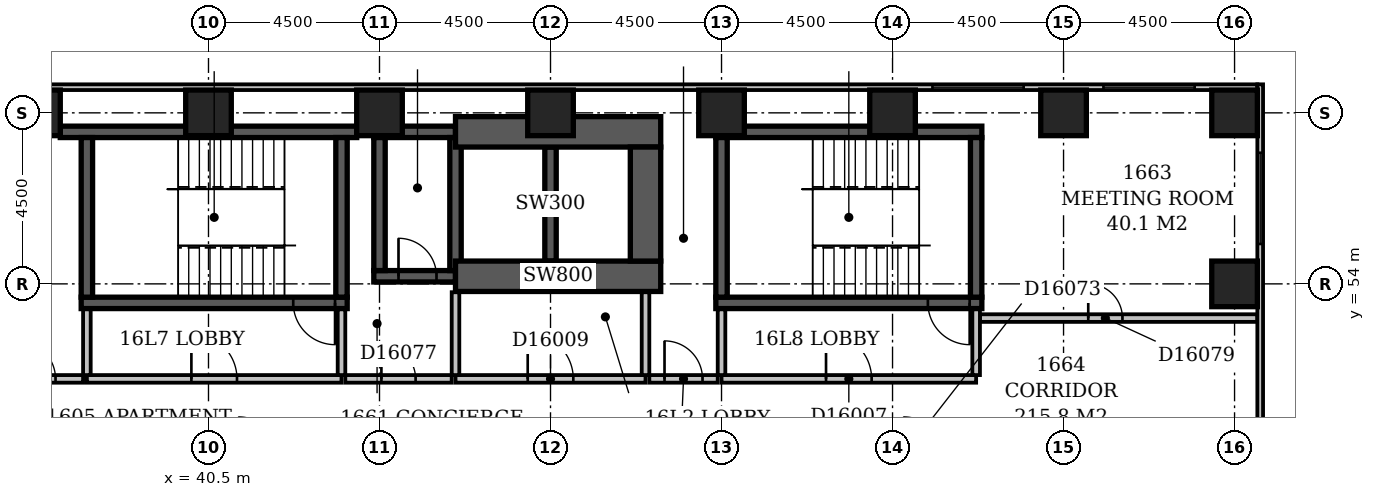
"""IFC4 building model, lengths in metres.
Left out: names, types, materials, properties, quantities, classifications, styles, units other than length and angle.
Written with IfcOpenShell. Run it as: python <this file> out.ifc"""

import sys

from ifc_helpers import new_model, si_unit, direction, frame, frame_2d, origin, origin_2d, place, context, subcontext, project, spatial, rectangle, extrude, element, fill, save


model = new_model("IFC4")
c1 = context("Model", 3, precision=1e-05, world=origin(), true_north=direction((0.0, 1.0)))
c2 = subcontext(c1, "Body", "Model", "MODEL_VIEW")
j1 = project(units=[si_unit("LENGTHUNIT", "METRE"), si_unit("PLANEANGLEUNIT", "RADIAN")], contexts=[c1])
p1 = place(None, origin())
s1 = spatial("IfcSite", under=j1, at=p1, CompositionType="ELEMENT")
p2 = place(p1, origin())
s2 = spatial("IfcBuilding", under=s1, at=p2, CompositionType="ELEMENT")
p3 = place(p2, frame((0.0, 0.0, 68.6)))
s3 = spatial("IfcBuildingStorey", under=s2, at=p3, CompositionType="ELEMENT", Elevation=68.6)
p4 = place(p3, frame((36.6, 58.0, -0.3), z_axis=(0.0, 0.0, 1.0), x_axis=(1.0, 0.0, 0.0)))
e1 = element("IfcWall", 1, at=p4, inside=s3, PredefinedType="SHEAR", context=c2, shape_type="SweptSolid", body=[
    extrude(rectangle(XDim=7.8, YDim=0.3, at=frame_2d((3.9, 0.0))), origin(), (0.0, 0.0, 1.0), 3.6),
])
p5 = place(p3, frame((37.15, 53.5, -0.3), z_axis=(0.0, 0.0, 1.0), x_axis=(1.0, 0.0, 0.0)))
e2 = element("IfcWall", 2, at=p5, inside=s3, PredefinedType="SHEAR", context=c2, shape_type="SweptSolid", body=[
    extrude(rectangle(XDim=7.0, YDim=0.3, at=frame_2d((3.5, 0.0))), origin(), (0.0, 0.0, 1.0), 3.6),
])
p6 = place(p5, frame((5.58, 0.0, 0.3)))
e3 = element("IfcOpeningElement", 3, at=p6, cuts=e2, PredefinedType="OPENING", context=c2, shape_type="SweptSolid", body=[
    extrude(rectangle(XDim=1.1, YDim=2.1, at=frame_2d((0.55, 1.05))), frame((0.0, 0.162, 0.0), z_axis=(0.0, -1.0, 0.0), x_axis=(1.0, 0.0, 0.0)), (0.0, 0.0, 1.0), 0.324),
])
for number, where, z_axis, x_axis in (
    (4, (37.3, 53.65, -0.3), (0.0, 0.0, 1.0), (0.0, 1.0, 0.0)),
    (5, (44.0, 53.65, -0.3), (0.0, 0.0, 1.0), (0.0, 1.0, 0.0)),
):
    element("IfcWall", number, at=place(p3, frame(where, z_axis=z_axis, x_axis=x_axis)), inside=s3, PredefinedType="SHEAR", context=c2, shape_type="SweptSolid", body=[
        extrude(rectangle(XDim=4.2, YDim=0.3, at=frame_2d((2.1, 0.0))), origin(), (0.0, 0.0, 1.0), 3.6),
    ])
p7 = place(p3, frame((44.85, 54.2, -0.3), z_axis=(0.0, 0.0, 1.0), x_axis=(1.0, 0.0, 0.0)))
e6 = element("IfcWall", 6, at=p7, inside=s3, PredefinedType="SHEAR", context=c2, shape_type="SweptSolid", body=[
    extrude(rectangle(XDim=2.15, YDim=0.3, at=frame_2d((1.075, 0.0))), origin(), (0.0, 0.0, 1.0), 3.6),
])
p8 = place(p7, frame((0.65, 0.0, 0.3)))
e7 = element("IfcOpeningElement", 7, at=p8, cuts=e6, PredefinedType="OPENING", context=c2, shape_type="SweptSolid", body=[
    extrude(rectangle(XDim=1.0, YDim=2.1, at=frame_2d((0.5, 1.05))), frame((0.0, 0.162, 0.0), z_axis=(0.0, -1.0, 0.0), x_axis=(1.0, 0.0, 0.0)), (0.0, 0.0, 1.0), 0.324),
])
p9 = place(p3, frame((44.85, 58.0, -0.3), z_axis=(0.0, 0.0, 1.0), x_axis=(1.0, 0.0, 0.0)))
e8 = element("IfcWall", 8, at=p9, inside=s3, PredefinedType="SHEAR", context=c2, shape_type="SweptSolid", body=[
    extrude(rectangle(XDim=2.15, YDim=0.3, at=frame_2d((1.075, 0.0))), origin(), (0.0, 0.0, 1.0), 3.6),
])
p10 = place(p3, frame((45.0, 54.35, -0.3), z_axis=(0.0, 0.0, 1.0), x_axis=(0.0, 1.0, 0.0)))
e9 = element("IfcWall", 9, at=p10, inside=s3, PredefinedType="SHEAR", context=c2, shape_type="SweptSolid", body=[
    extrude(rectangle(XDim=3.5, YDim=0.3, at=frame_2d((1.75, 0.0))), origin(), (0.0, 0.0, 1.0), 3.6),
])
p11 = place(p3, frame((47.0, 54.2, -0.3), z_axis=(0.0, 0.0, 1.0), x_axis=(1.0, 0.0, 0.0)))
e10 = element("IfcWall", 10, at=p11, inside=s3, PredefinedType="SHEAR", context=c2, shape_type="SweptSolid", body=[
    extrude(rectangle(XDim=5.4, YDim=0.8, at=frame_2d((2.7, 0.0))), origin(), (0.0, 0.0, 1.0), 3.6),
])
p12 = place(p3, frame((47.0, 54.35, -0.3), z_axis=(0.0, 0.0, 1.0), x_axis=(0.0, 1.0, 0.0)))
e11 = element("IfcWall", 11, at=p12, inside=s3, PredefinedType="SHEAR", context=c2, shape_type="SweptSolid", body=[
    extrude(rectangle(XDim=3.5, YDim=0.3, at=frame_2d((1.75, 0.0))), origin(), (0.0, 0.0, 1.0), 3.6),
])
p13 = place(p3, frame((47.0, 58.0, -0.3), z_axis=(0.0, 0.0, 1.0), x_axis=(1.0, 0.0, 0.0)))
e12 = element("IfcWall", 12, at=p13, inside=s3, PredefinedType="SHEAR", context=c2, shape_type="SweptSolid", body=[
    extrude(rectangle(XDim=5.4, YDim=0.8, at=frame_2d((2.7, 0.0))), origin(), (0.0, 0.0, 1.0), 3.6),
])
p14 = place(p3, frame((49.5, 54.6, -0.3), z_axis=(0.0, 0.0, 1.0), x_axis=(0.0, 1.0, 0.0)))
e13 = element("IfcWall", 13, at=p14, inside=s3, PredefinedType="SHEAR", context=c2, shape_type="SweptSolid", body=[
    extrude(rectangle(XDim=3.0, YDim=0.3, at=frame_2d((1.5, 0.0))), origin(), (0.0, 0.0, 1.0), 3.6),
])
p15 = place(p3, frame((52.0, 54.6, -0.3), z_axis=(0.0, 0.0, 1.0), x_axis=(0.0, 1.0, 0.0)))
e14 = element("IfcWall", 14, at=p15, inside=s3, PredefinedType="SHEAR", context=c2, shape_type="SweptSolid", body=[
    extrude(rectangle(XDim=3.0, YDim=0.8, at=frame_2d((1.5, 0.0))), origin(), (0.0, 0.0, 1.0), 3.6),
])
p16 = place(p3, frame((53.85, 53.5, -0.3), z_axis=(0.0, 0.0, 1.0), x_axis=(1.0, 0.0, 0.0)))
e15 = element("IfcWall", 15, at=p16, inside=s3, PredefinedType="SHEAR", context=c2, shape_type="SweptSolid", body=[
    extrude(rectangle(XDim=7.0, YDim=0.3, at=frame_2d((3.5, 0.0))), origin(), (0.0, 0.0, 1.0), 3.6),
])
p17 = place(p16, frame((5.58, 0.0, 0.3)))
e16 = element("IfcOpeningElement", 16, at=p17, cuts=e15, PredefinedType="OPENING", context=c2, shape_type="SweptSolid", body=[
    extrude(rectangle(XDim=1.1, YDim=2.1, at=frame_2d((0.55, 1.05))), frame((0.0, 0.162, 0.0), z_axis=(0.0, -1.0, 0.0), x_axis=(1.0, 0.0, 0.0)), (0.0, 0.0, 1.0), 0.324),
])
p18 = place(p3, frame((53.85, 58.0, -0.3), z_axis=(0.0, 0.0, 1.0), x_axis=(1.0, 0.0, 0.0)))
e17 = element("IfcWall", 17, at=p18, inside=s3, PredefinedType="SHEAR", context=c2, shape_type="SweptSolid", body=[
    extrude(rectangle(XDim=7.0, YDim=0.3, at=frame_2d((3.5, 0.0))), origin(), (0.0, 0.0, 1.0), 3.6),
])
for number, where, z_axis, x_axis in (
    (18, (54.0, 53.65, -0.3), (0.0, 0.0, 1.0), (0.0, 1.0, 0.0)),
    (19, (60.7, 53.65, -0.3), (0.0, 0.0, 1.0), (0.0, 1.0, 0.0)),
):
    element("IfcWall", number, at=place(p3, frame(where, z_axis=z_axis, x_axis=x_axis)), inside=s3, PredefinedType="SHEAR", context=c2, shape_type="SweptSolid", body=[
        extrude(rectangle(XDim=4.2, YDim=0.3, at=frame_2d((2.1, 0.0))), origin(), (0.0, 0.0, 1.0), 3.6),
    ])
for number, where, z_axis, x_axis in (
    (20, (67.5, 54.0, -0.3), (0.0, 0.0, 1.0), (1.0, 0.0, 0.0)),
    (21, (36.0, 58.5, -0.3), (0.0, 0.0, 1.0), (1.0, 0.0, 0.0)),
    (22, (40.5, 58.5, -0.3), (0.0, 0.0, 1.0), (1.0, 0.0, 0.0)),
    (23, (45.0, 58.5, -0.3), (0.0, 0.0, 1.0), (1.0, 0.0, 0.0)),
    (24, (49.5, 58.5, -0.3), (0.0, 0.0, 1.0), (1.0, 0.0, 0.0)),
    (25, (54.0, 58.5, -0.3), (0.0, 0.0, 1.0), (1.0, 0.0, 0.0)),
    (26, (58.5, 58.5, -0.3), (0.0, 0.0, 1.0), (1.0, 0.0, 0.0)),
    (27, (63.0, 58.5, -0.3), (0.0, 0.0, 1.0), (1.0, 0.0, 0.0)),
    (28, (67.5, 58.5, -0.3), (0.0, 0.0, 1.0), (1.0, 0.0, 0.0)),
):
    element("IfcColumn", number, at=place(p3, frame(where, z_axis=z_axis, x_axis=x_axis)), inside=s3, PredefinedType="COLUMN", context=c2, shape_type="SweptSolid", body=[
        extrude(rectangle(XDim=1.2, YDim=1.2, at=origin_2d()), origin(), (0.0, 0.0, 1.0), 3.6),
    ])
p19 = place(p3, frame((68.175, 35.4, 0.0), z_axis=(0.0, 0.0, 1.0), x_axis=(0.0, 1.0, 0.0)))
e29 = element("IfcWall", 29, at=p19, inside=s3, PredefinedType="STANDARD", context=c2, shape_type="SweptSolid", body=[
    extrude(rectangle(XDim=23.85, YDim=0.15, at=frame_2d((11.925, 0.0))), origin(), (0.0, 0.0, 1.0), 2.7),
])
p20 = place(p19, frame((1.65, 0.0, 0.6)))
e30 = element("IfcOpeningElement", 30, at=p20, cuts=e29, PredefinedType="OPENING", context=c2, shape_type="SweptSolid", body=[
    extrude(rectangle(XDim=2.4, YDim=1.8, at=frame_2d((1.2, 0.9))), frame((0.0, 0.087, 0.0), z_axis=(0.0, -1.0, 0.0), x_axis=(1.0, 0.0, 0.0)), (0.0, 0.0, 1.0), 0.174),
])
p21 = place(p19, frame((10.53, 0.0, 0.6)))
e31 = element("IfcOpeningElement", 31, at=p21, cuts=e29, PredefinedType="OPENING", context=c2, shape_type="SweptSolid", body=[
    extrude(rectangle(XDim=1.5, YDim=1.8, at=frame_2d((0.75, 0.9))), frame((0.0, 0.087, 0.0), z_axis=(0.0, -1.0, 0.0), x_axis=(1.0, 0.0, 0.0)), (0.0, 0.0, 1.0), 0.174),
])
p22 = place(p19, frame((19.65, 0.0, 0.6)))
e32 = element("IfcOpeningElement", 32, at=p22, cuts=e29, PredefinedType="OPENING", context=c2, shape_type="SweptSolid", body=[
    extrude(rectangle(XDim=2.4, YDim=1.8, at=frame_2d((1.2, 0.9))), frame((0.0, 0.087, 0.0), z_axis=(0.0, -1.0, 0.0), x_axis=(1.0, 0.0, 0.0)), (0.0, 0.0, 1.0), 0.174),
])
p23 = place(p3, frame((68.1, 59.175, 0.0), z_axis=(0.0, 0.0, 1.0), x_axis=(-1.0, 0.0, 0.0)))
e33 = element("IfcWall", 33, at=p23, inside=s3, PredefinedType="STANDARD", context=c2, shape_type="SweptSolid", body=[
    extrude(rectangle(XDim=68.85, YDim=0.15, at=frame_2d((34.425, 0.0))), origin(), (0.0, 0.0, 1.0), 2.7),
])
p24 = place(p23, frame((1.65, 0.0, 0.6)))
e34 = element("IfcOpeningElement", 34, at=p24, cuts=e33, PredefinedType="OPENING", context=c2, shape_type="SweptSolid", body=[
    extrude(rectangle(XDim=2.4, YDim=1.8, at=frame_2d((1.2, 0.9))), frame((0.0, 0.087, 0.0), z_axis=(0.0, -1.0, 0.0), x_axis=(1.0, 0.0, 0.0)), (0.0, 0.0, 1.0), 0.174),
])
p25 = place(p23, frame((6.15, 0.0, 0.6)))
e35 = element("IfcOpeningElement", 35, at=p25, cuts=e33, PredefinedType="OPENING", context=c2, shape_type="SweptSolid", body=[
    extrude(rectangle(XDim=2.4, YDim=1.8, at=frame_2d((1.2, 0.9))), frame((0.0, 0.087, 0.0), z_axis=(0.0, -1.0, 0.0), x_axis=(1.0, 0.0, 0.0)), (0.0, 0.0, 1.0), 0.174),
])
p26 = place(p23, frame((37.53, 0.0, 0.6)))
e36 = element("IfcOpeningElement", 36, at=p26, cuts=e33, PredefinedType="OPENING", context=c2, shape_type="SweptSolid", body=[
    extrude(rectangle(XDim=1.5, YDim=1.8, at=frame_2d((0.75, 0.9))), frame((0.0, 0.087, 0.0), z_axis=(0.0, -1.0, 0.0), x_axis=(1.0, 0.0, 0.0)), (0.0, 0.0, 1.0), 0.174),
])
p27 = place(p3, frame((47.0, 51.5, 0.0), z_axis=(0.0, 0.0, 1.0), x_axis=(1.0, 0.0, 0.0)))
e37 = element("IfcWall", 37, at=p27, inside=s3, PredefinedType="PARTITIONING", context=c2, shape_type="SweptSolid", body=[
    extrude(rectangle(XDim=5.0, YDim=0.2, at=frame_2d((2.5, 0.0))), origin(), (0.0, 0.0, 1.0), 3.3),
])
p28 = place(p27, frame((1.9, 0.0, 0.0)))
e38 = element("IfcOpeningElement", 38, at=p28, cuts=e37, PredefinedType="OPENING", context=c2, shape_type="SweptSolid", body=[
    extrude(rectangle(XDim=1.2, YDim=2.1, at=frame_2d((0.6, 1.05))), frame((0.0, 0.112, 0.0), z_axis=(0.0, -1.0, 0.0), x_axis=(1.0, 0.0, 0.0)), (0.0, 0.0, 1.0), 0.224),
])
for number, where, z_axis, x_axis in (
    (39, (52.0, 51.6, 0.0), (0.0, 0.0, 1.0), (0.0, 1.0, 0.0)),
    (40, (47.0, 51.6, 0.0), (0.0, 0.0, 1.0), (0.0, 1.0, 0.0)),
):
    element("IfcWall", number, at=place(p3, frame(where, z_axis=z_axis, x_axis=x_axis)), inside=s3, PredefinedType="PARTITIONING", context=c2, shape_type="SweptSolid", body=[
        extrude(rectangle(XDim=2.18, YDim=0.2, at=frame_2d((1.09, 0.0))), origin(), (0.0, 0.0, 1.0), 3.3),
    ])
p29 = place(p3, frame((37.3, 51.5, 0.0), z_axis=(0.0, 0.0, 1.0), x_axis=(1.0, 0.0, 0.0)))
e41 = element("IfcWall", 41, at=p29, inside=s3, PredefinedType="PARTITIONING", context=c2, shape_type="SweptSolid", body=[
    extrude(rectangle(XDim=6.7, YDim=0.2, at=frame_2d((3.35, 0.0))), origin(), (0.0, 0.0, 1.0), 3.3),
])
p30 = place(p29, frame((2.75, 0.0, 0.0)))
e42 = element("IfcOpeningElement", 42, at=p30, cuts=e41, PredefinedType="OPENING", context=c2, shape_type="SweptSolid", body=[
    extrude(rectangle(XDim=1.2, YDim=2.1, at=frame_2d((0.6, 1.05))), frame((0.0, 0.112, 0.0), z_axis=(0.0, -1.0, 0.0), x_axis=(1.0, 0.0, 0.0)), (0.0, 0.0, 1.0), 0.224),
])
for number, where, z_axis, x_axis in (
    (43, (44.0, 51.6, 0.0), (0.0, 0.0, 1.0), (0.0, 1.0, 0.0)),
    (44, (37.3, 51.6, 0.0), (0.0, 0.0, 1.0), (0.0, 1.0, 0.0)),
):
    element("IfcWall", number, at=place(p3, frame(where, z_axis=z_axis, x_axis=x_axis)), inside=s3, PredefinedType="PARTITIONING", context=c2, shape_type="SweptSolid", body=[
        extrude(rectangle(XDim=1.73, YDim=0.2, at=frame_2d((0.865, 0.0))), origin(), (0.0, 0.0, 1.0), 3.3),
    ])
p31 = place(p3, frame((54.0, 51.5, 0.0), z_axis=(0.0, 0.0, 1.0), x_axis=(1.0, 0.0, 0.0)))
e45 = element("IfcWall", 45, at=p31, inside=s3, PredefinedType="PARTITIONING", context=c2, shape_type="SweptSolid", body=[
    extrude(rectangle(XDim=6.7, YDim=0.2, at=frame_2d((3.35, 0.0))), origin(), (0.0, 0.0, 1.0), 3.3),
])
p32 = place(p31, frame((2.75, 0.0, 0.0)))
e46 = element("IfcOpeningElement", 46, at=p32, cuts=e45, PredefinedType="OPENING", context=c2, shape_type="SweptSolid", body=[
    extrude(rectangle(XDim=1.2, YDim=2.1, at=frame_2d((0.6, 1.05))), frame((0.0, 0.112, 0.0), z_axis=(0.0, -1.0, 0.0), x_axis=(1.0, 0.0, 0.0)), (0.0, 0.0, 1.0), 0.224),
])
p33 = place(p3, frame((60.7, 51.6, 0.0), z_axis=(0.0, 0.0, 1.0), x_axis=(0.0, 1.0, 0.0)))
e47 = element("IfcWall", 47, at=p33, inside=s3, PredefinedType="PARTITIONING", context=c2, shape_type="SweptSolid", body=[
    extrude(rectangle(XDim=1.73, YDim=0.2, at=frame_2d((0.865, 0.0))), origin(), (0.0, 0.0, 1.0), 3.3),
])
p34 = place(p3, frame((54.0, 51.6, 0.0), z_axis=(0.0, 0.0, 1.0), x_axis=(0.0, 1.0, 0.0)))
e48 = element("IfcWall", 48, at=p34, inside=s3, PredefinedType="PARTITIONING", context=c2, shape_type="SweptSolid", body=[
    extrude(rectangle(XDim=1.73, YDim=0.2, at=frame_2d((0.865, 0.0))), origin(), (0.0, 0.0, 1.0), 2.6),
])
p35 = place(p3, frame((27.9, 51.5, 0.0), z_axis=(0.0, 0.0, 1.0), x_axis=(1.0, 0.0, 0.0)))
e49 = element("IfcWall", 49, at=p35, inside=s3, PredefinedType="PARTITIONING", context=c2, shape_type="SweptSolid", body=[
    extrude(rectangle(XDim=9.3, YDim=0.2, at=frame_2d((4.65, 0.0))), origin(), (0.0, 0.0, 1.0), 3.3),
])
p36 = place(p35, frame((2.875, 0.0, 0.0)))
e50 = element("IfcOpeningElement", 50, at=p36, cuts=e49, PredefinedType="OPENING", context=c2, shape_type="SweptSolid", body=[
    extrude(rectangle(XDim=0.9, YDim=2.1, at=frame_2d((0.45, 1.05))), frame((0.0, 0.112, 0.0), z_axis=(0.0, -1.0, 0.0), x_axis=(1.0, 0.0, 0.0)), (0.0, 0.0, 1.0), 0.224),
])
p37 = place(p35, frame((7.575, 0.0, 0.0)))
e51 = element("IfcOpeningElement", 51, at=p37, cuts=e49, PredefinedType="OPENING", context=c2, shape_type="SweptSolid", body=[
    extrude(rectangle(XDim=1.0, YDim=2.1, at=frame_2d((0.5, 1.05))), frame((0.0, 0.112, 0.0), z_axis=(0.0, -1.0, 0.0), x_axis=(1.0, 0.0, 0.0)), (0.0, 0.0, 1.0), 0.224),
])
p38 = place(p3, frame((44.1, 51.5, 0.0), z_axis=(0.0, 0.0, 1.0), x_axis=(1.0, 0.0, 0.0)))
e52 = element("IfcWall", 52, at=p38, inside=s3, PredefinedType="PARTITIONING", context=c2, shape_type="SweptSolid", body=[
    extrude(rectangle(XDim=2.8, YDim=0.2, at=frame_2d((1.4, 0.0))), origin(), (0.0, 0.0, 1.0), 3.3),
])
p39 = place(p38, frame((0.95, 0.0, 0.0)))
e53 = element("IfcOpeningElement", 53, at=p39, cuts=e52, PredefinedType="OPENING", context=c2, shape_type="SweptSolid", body=[
    extrude(rectangle(XDim=0.9, YDim=2.1, at=frame_2d((0.45, 1.05))), frame((0.0, 0.112, 0.0), z_axis=(0.0, -1.0, 0.0), x_axis=(1.0, 0.0, 0.0)), (0.0, 0.0, 1.0), 0.224),
])
p40 = place(p3, frame((52.1, 51.5, 0.0), z_axis=(0.0, 0.0, 1.0), x_axis=(1.0, 0.0, 0.0)))
e54 = element("IfcWall", 54, at=p40, inside=s3, PredefinedType="PARTITIONING", context=c2, shape_type="SweptSolid", body=[
    extrude(rectangle(XDim=1.8, YDim=0.2, at=frame_2d((0.9, 0.0))), origin(), (0.0, 0.0, 1.0), 3.3),
])
p41 = place(p40, frame((0.4, 0.0, 0.0)))
e55 = element("IfcOpeningElement", 55, at=p41, cuts=e54, PredefinedType="OPENING", context=c2, shape_type="SweptSolid", body=[
    extrude(rectangle(XDim=1.0, YDim=2.1, at=frame_2d((0.5, 1.05))), frame((0.0, 0.112, 0.0), z_axis=(0.0, -1.0, 0.0), x_axis=(1.0, 0.0, 0.0)), (0.0, 0.0, 1.0), 0.224),
])
p42 = place(p3, frame((60.8, 53.1, 0.0), z_axis=(0.0, 0.0, 1.0), x_axis=(1.0, 0.0, 0.0)))
e56 = element("IfcWall", 56, at=p42, inside=s3, PredefinedType="PARTITIONING", context=c2, shape_type="SweptSolid", body=[
    extrude(rectangle(XDim=7.3, YDim=0.2, at=frame_2d((3.65, 0.0))), origin(), (0.0, 0.0, 1.0), 3.3),
])
p43 = place(p42, frame((2.85, 0.0, 0.0)))
e57 = element("IfcOpeningElement", 57, at=p43, cuts=e56, PredefinedType="OPENING", context=c2, shape_type="SweptSolid", body=[
    extrude(rectangle(XDim=0.9, YDim=2.1, at=frame_2d((0.45, 1.05))), frame((0.0, 0.112, 0.0), z_axis=(0.0, -1.0, 0.0), x_axis=(1.0, 0.0, 0.0)), (0.0, 0.0, 1.0), 0.224),
])
p44 = place(p22, origin())
e58 = element("IfcWindow", 58, at=p44, inside=s3, PartitioningType="SINGLE_PANEL", PredefinedType="WINDOW", context=c2, shape_type="SweptSolid", body=[
    extrude(rectangle(XDim=2.4, YDim=1.8, at=frame_2d((1.2, 0.9))), frame((0.0, 0.03, 0.0), z_axis=(0.0, -1.0, 0.0), x_axis=(1.0, 0.0, 0.0)), (0.0, 0.0, 1.0), 0.06),
])
fill(e32, e58)
p45 = place(p24, origin())
e59 = element("IfcWindow", 59, at=p45, inside=s3, PartitioningType="SINGLE_PANEL", PredefinedType="WINDOW", context=c2, shape_type="SweptSolid", body=[
    extrude(rectangle(XDim=2.4, YDim=1.8, at=frame_2d((1.2, 0.9))), frame((0.0, 0.03, 0.0), z_axis=(0.0, -1.0, 0.0), x_axis=(1.0, 0.0, 0.0)), (0.0, 0.0, 1.0), 0.06),
])
fill(e34, e59)
p46 = place(p25, origin())
e60 = element("IfcWindow", 60, at=p46, inside=s3, PartitioningType="SINGLE_PANEL", PredefinedType="WINDOW", context=c2, shape_type="SweptSolid", body=[
    extrude(rectangle(XDim=2.4, YDim=1.8, at=frame_2d((1.2, 0.9))), frame((0.0, 0.03, 0.0), z_axis=(0.0, -1.0, 0.0), x_axis=(1.0, 0.0, 0.0)), (0.0, 0.0, 1.0), 0.06),
])
fill(e35, e60)
p47 = place(p30, origin())
e61 = element("IfcDoor", 61, at=p47, inside=s3, OperationType="SINGLE_SWING_LEFT", PredefinedType="DOOR", context=c2, shape_type="SweptSolid", body=[
    extrude(rectangle(XDim=1.2, YDim=2.1, at=frame_2d((0.6, 1.05))), frame((0.0, 0.025, 0.0), z_axis=(0.0, -1.0, 0.0), x_axis=(1.0, 0.0, 0.0)), (0.0, 0.0, 1.0), 0.05),
])
fill(e42, e61)
p48 = place(p32, origin())
e62 = element("IfcDoor", 62, at=p48, inside=s3, OperationType="SINGLE_SWING_LEFT", PredefinedType="DOOR", context=c2, shape_type="SweptSolid", body=[
    extrude(rectangle(XDim=1.2, YDim=2.1, at=frame_2d((0.6, 1.05))), frame((0.0, 0.025, 0.0), z_axis=(0.0, -1.0, 0.0), x_axis=(1.0, 0.0, 0.0)), (0.0, 0.0, 1.0), 0.05),
])
fill(e46, e62)
p49 = place(p28, origin())
e63 = element("IfcDoor", 63, at=p49, inside=s3, OperationType="SINGLE_SWING_LEFT", PredefinedType="DOOR", context=c2, shape_type="SweptSolid", body=[
    extrude(rectangle(XDim=1.2, YDim=2.1, at=frame_2d((0.6, 1.05))), frame((0.0, 0.025, 0.0), z_axis=(0.0, -1.0, 0.0), x_axis=(1.0, 0.0, 0.0)), (0.0, 0.0, 1.0), 0.05),
])
fill(e38, e63)
p50 = place(p8, origin())
e64 = element("IfcDoor", 64, at=p50, inside=s3, OperationType="SINGLE_SWING_LEFT", PredefinedType="DOOR", context=c2, shape_type="SweptSolid", body=[
    extrude(rectangle(XDim=1.0, YDim=2.1, at=frame_2d((0.5, 1.05))), frame((0.0, 0.025, 0.0), z_axis=(0.0, -1.0, 0.0), x_axis=(1.0, 0.0, 0.0)), (0.0, 0.0, 1.0), 0.05),
])
fill(e7, e64)
p51 = place(p6, origin())
e65 = element("IfcDoor", 65, at=p51, inside=s3, OperationType="SINGLE_SWING_RIGHT", PredefinedType="DOOR", context=c2, shape_type="SweptSolid", body=[
    extrude(rectangle(XDim=1.1, YDim=2.1, at=frame_2d((0.55, 1.05))), frame((0.0, 0.025, 0.0), z_axis=(0.0, -1.0, 0.0), x_axis=(1.0, 0.0, 0.0)), (0.0, 0.0, 1.0), 0.05),
])
fill(e3, e65)
p52 = place(p17, origin())
e66 = element("IfcDoor", 66, at=p52, inside=s3, OperationType="SINGLE_SWING_RIGHT", PredefinedType="DOOR", context=c2, shape_type="SweptSolid", body=[
    extrude(rectangle(XDim=1.1, YDim=2.1, at=frame_2d((0.55, 1.05))), frame((0.0, 0.025, 0.0), z_axis=(0.0, -1.0, 0.0), x_axis=(1.0, 0.0, 0.0)), (0.0, 0.0, 1.0), 0.05),
])
fill(e16, e66)
p53 = place(p37, origin())
e67 = element("IfcDoor", 67, at=p53, inside=s3, OperationType="SINGLE_SWING_LEFT", PredefinedType="DOOR", context=c2, shape_type="SweptSolid", body=[
    extrude(rectangle(XDim=1.0, YDim=2.1, at=frame_2d((0.5, 1.05))), frame((0.0, 0.025, 0.0), z_axis=(0.0, -1.0, 0.0), x_axis=(1.0, 0.0, 0.0)), (0.0, 0.0, 1.0), 0.05),
])
fill(e51, e67)
p54 = place(p39, origin())
e68 = element("IfcDoor", 68, at=p54, inside=s3, OperationType="SINGLE_SWING_LEFT", PredefinedType="DOOR", context=c2, shape_type="SweptSolid", body=[
    extrude(rectangle(XDim=0.9, YDim=2.1, at=frame_2d((0.45, 1.05))), frame((0.0, 0.025, 0.0), z_axis=(0.0, -1.0, 0.0), x_axis=(1.0, 0.0, 0.0)), (0.0, 0.0, 1.0), 0.05),
])
fill(e53, e68)
p55 = place(p41, origin())
e69 = element("IfcDoor", 69, at=p55, inside=s3, OperationType="SINGLE_SWING_LEFT", PredefinedType="DOOR", context=c2, shape_type="SweptSolid", body=[
    extrude(rectangle(XDim=1.0, YDim=2.1, at=frame_2d((0.5, 1.05))), frame((0.0, 0.025, 0.0), z_axis=(0.0, -1.0, 0.0), x_axis=(1.0, 0.0, 0.0)), (0.0, 0.0, 1.0), 0.05),
])
fill(e55, e69)
p56 = place(p43, origin())
e70 = element("IfcDoor", 70, at=p56, inside=s3, OperationType="SINGLE_SWING_LEFT", PredefinedType="DOOR", context=c2, shape_type="SweptSolid", body=[
    extrude(rectangle(XDim=0.9, YDim=2.1, at=frame_2d((0.45, 1.05))), frame((0.0, 0.025, 0.0), z_axis=(0.0, -1.0, 0.0), x_axis=(1.0, 0.0, 0.0)), (0.0, 0.0, 1.0), 0.05),
])
fill(e57, e70)
save(model, sys.argv[1])
